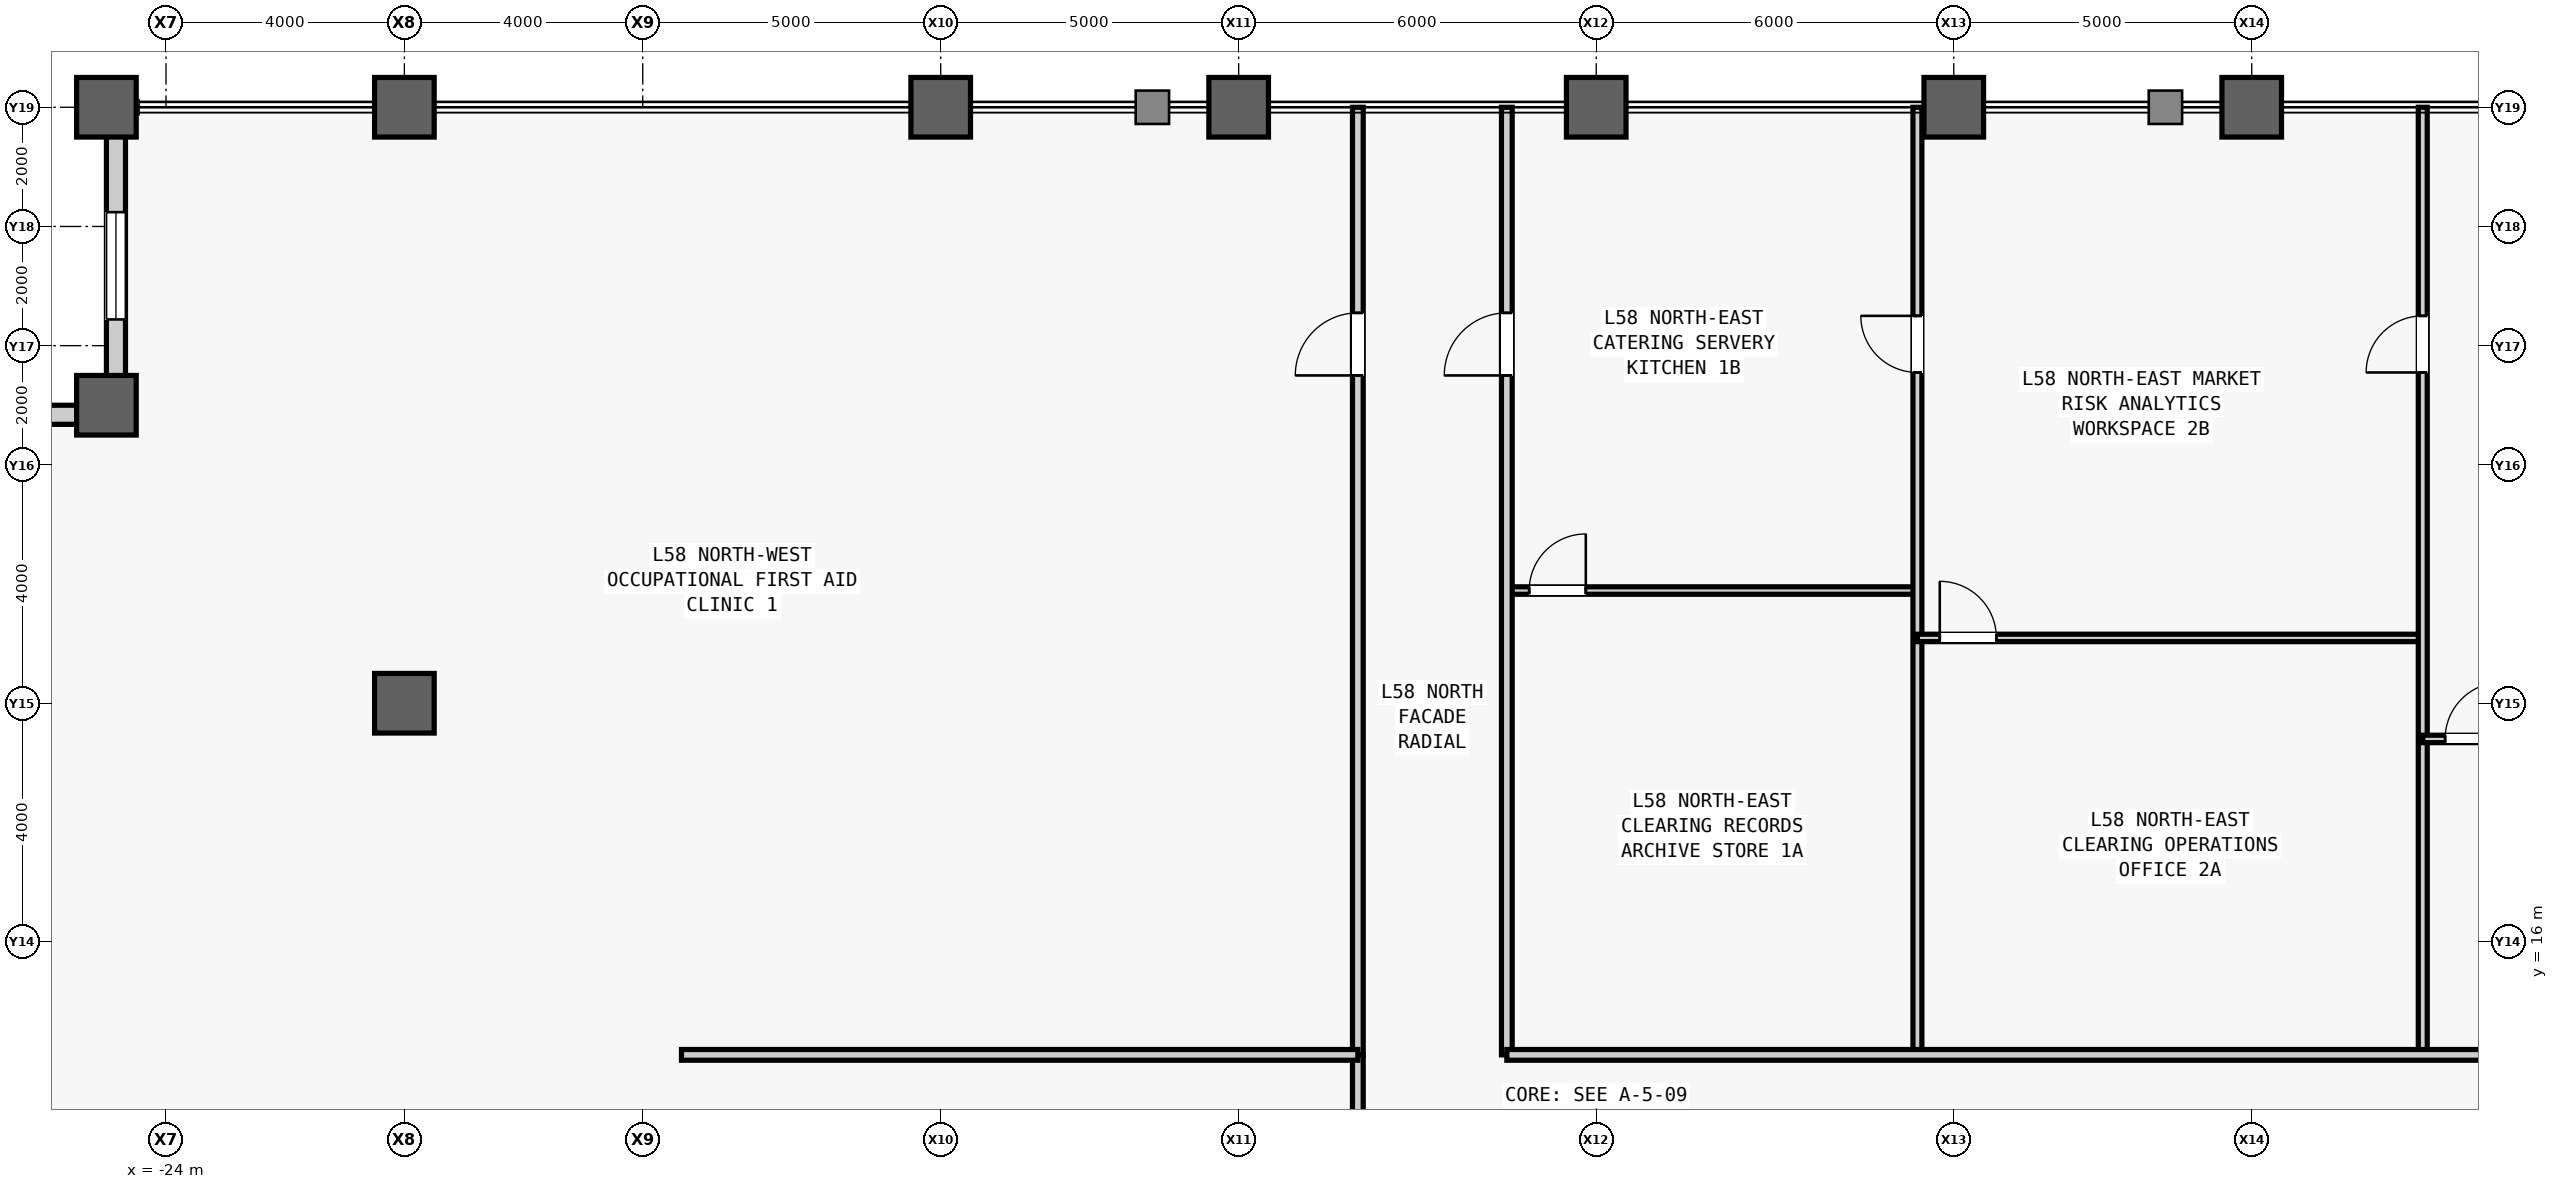
"""IFC4 building model, lengths in metres.
Left out: names, types, materials, properties, quantities, classifications, styles, units other than length and angle.
Written with IfcOpenShell. Run it as: python <this file> out.ifc"""

import sys

from ifc_helpers import new_model, si_unit, direction, frame, frame_2d, origin, origin_2d, place, context, subcontext, project, spatial, rectangle, hollow_rectangle, extrude, source, transform, mapped, element, fill, save


model = new_model("IFC4")
c1 = context("Model", 3, precision=1e-05, world=origin(), true_north=direction((0.0, 1.0)))
c2 = subcontext(c1, "Body", "Model", "MODEL_VIEW")
j1 = project(units=[si_unit("LENGTHUNIT", "METRE"), si_unit("PLANEANGLEUNIT", "RADIAN")], contexts=[c1])
p1 = place(None, origin())
s1 = spatial("IfcSite", under=j1, at=p1, CompositionType="ELEMENT")
p2 = place(p1, origin())
s2 = spatial("IfcBuilding", under=s1, at=p2, CompositionType="ELEMENT")
p3 = place(p2, frame((0.0, 0.0, 247.1)))
s3 = spatial("IfcBuildingStorey", under=s2, at=p3, CompositionType="ELEMENT", Elevation=247.1)
m1 = source(origin(), c2, "Body", "SweptSolid", [
    extrude(hollow_rectangle(XDim=1.0, YDim=1.0, WallThickness=0.055, at=origin_2d()), origin(), (0.0, 0.0, 1.0), 4.0),
])
for number, where, z_axis, x_axis in (
    (1, (-25.0, 25.0, 0.0), (0.0, 0.0, 1.0), (1.0, 0.0, 0.0)),
    (2, (-25.0, 30.0, 0.0), (0.0, 0.0, 1.0), (1.0, 0.0, 0.0)),
    (3, (-20.0, 20.0, 0.0), (0.0, 0.0, 1.0), (1.0, 0.0, 0.0)),
    (4, (-20.0, 30.0, 0.0), (0.0, 0.0, 1.0), (1.0, 0.0, 0.0)),
    (5, (-11.0, 30.0, 0.0), (0.0, 0.0, 1.0), (1.0, 0.0, 0.0)),
    (6, (-6.0, 30.0, 0.0), (0.0, 0.0, 1.0), (1.0, 0.0, 0.0)),
    (7, (0.0, 30.0, 0.0), (0.0, 0.0, 1.0), (1.0, 0.0, 0.0)),
    (8, (6.0, 30.0, 0.0), (0.0, 0.0, 1.0), (1.0, 0.0, 0.0)),
    (9, (11.0, 30.0, 0.0), (0.0, 0.0, 1.0), (1.0, 0.0, 0.0)),
):
    element("IfcColumn", number, at=place(p3, frame(where, z_axis=z_axis, x_axis=x_axis)), inside=s3, PredefinedType="COLUMN", context=c2, shape_type="MappedRepresentation", body=[
        mapped(m1, transform((0.0, 0.0, 0.0), scale=1.0)),
    ])
m2 = source(origin(), c2, "Body", "SweptSolid", [
    extrude(rectangle(XDim=4.68, YDim=0.32, at=frame_2d((2.34, 0.0))), origin(), (0.0, 0.0, 1.0), 3.164),
])
p4 = place(p3, frame((-24.84, 25.0, 0.0), z_axis=(0.0, 0.0, 1.0), x_axis=(0.0, 1.0, 0.0)))
e10 = element("IfcWall", 10, at=p4, inside=s3, PredefinedType="STANDARD", context=c2, shape_type="MappedRepresentation", body=[
    mapped(m2, transform((0.0, 0.0, 0.0), scale=1.0)),
])
m3 = source(origin(), c2, "Body", "SweptSolid", [
    extrude(rectangle(XDim=1.8, YDim=2.4, at=frame_2d((0.9, 1.2))), frame((0.0, 0.17, 0.0), z_axis=(0.0, -1.0, 0.0), x_axis=(1.0, 0.0, 0.0)), (0.0, 0.0, 1.0), 0.34),
])
p5 = place(p4, frame((1.44, 0.0, 0.5)))
e11 = element("IfcOpeningElement", 11, at=p5, cuts=e10, PredefinedType="OPENING", context=c2, shape_type="MappedRepresentation", body=[
    mapped(m3, transform((0.0, 0.0, 0.0), scale=1.0)),
])
p6 = place(p3, frame((-25.0, 24.84, 0.0), z_axis=(0.0, 0.0, 1.0), x_axis=(-1.0, 0.0, 0.0)))
e12 = element("IfcWall", 12, at=p6, inside=s3, PredefinedType="STANDARD", context=c2, shape_type="MappedRepresentation", body=[
    mapped(m2, transform((0.0, 0.0, 0.0), scale=1.0)),
])
p7 = place(p6, frame((1.44, 0.0, 0.5)))
e13 = element("IfcOpeningElement", 13, at=p7, cuts=e12, PredefinedType="OPENING", context=c2, shape_type="MappedRepresentation", body=[
    mapped(m3, transform((0.0, 0.0, 0.0), scale=1.0)),
])
m4 = source(origin(), c2, "Body", "SweptSolid", [
    extrude(rectangle(XDim=3.1, YDim=0.18, at=frame_2d((1.55, 0.0))), origin(), (0.0, 0.0, 1.0), 3.78),
])
p8 = place(p3, frame((-4.0, 11.0, 0.0), z_axis=(0.0, 0.0, 1.0), x_axis=(0.0, 1.0, 0.0)))
e14 = element("IfcWall", 14, at=p8, inside=s3, PredefinedType="PARTITIONING", context=c2, shape_type="MappedRepresentation", body=[
    mapped(m4, transform((0.0, 0.0, 0.0), scale=1.0)),
])
m5 = source(origin(), c2, "Body", "SweptSolid", [
    extrude(rectangle(XDim=15.9, YDim=0.18, at=frame_2d((7.95, 0.0))), origin(), (0.0, 0.0, 1.0), 3.78),
])
p9 = place(p3, frame((-4.0, 14.1, 0.0), z_axis=(0.0, 0.0, 1.0), x_axis=(0.0, 1.0, 0.0)))
e15 = element("IfcWall", 15, at=p9, inside=s3, PredefinedType="PARTITIONING", context=c2, shape_type="MappedRepresentation", body=[
    mapped(m5, transform((0.0, 0.0, 0.0), scale=1.0)),
])
m6 = source(origin(), c2, "Body", "SweptSolid", [
    extrude(rectangle(XDim=1.05, YDim=2.2, at=frame_2d((0.525, 1.1))), frame((0.0, 0.1, 0.0), z_axis=(0.0, -1.0, 0.0), x_axis=(1.0, 0.0, 0.0)), (0.0, 0.0, 1.0), 0.2),
])
p10 = place(p9, frame((11.4, 0.0, 0.0)))
e16 = element("IfcOpeningElement", 16, at=p10, cuts=e15, PredefinedType="OPENING", context=c2, shape_type="MappedRepresentation", body=[
    mapped(m6, transform((0.0, 0.0, 0.0), scale=1.0)),
])
m7 = source(origin(), c2, "Body", "SweptSolid", [
    extrude(rectangle(XDim=11.35, YDim=0.18, at=frame_2d((5.675, 0.0))), origin(), (0.0, 0.0, 1.0), 3.78),
])
p11 = place(p3, frame((-15.35, 14.1, 0.0), z_axis=(0.0, 0.0, 1.0), x_axis=(1.0, 0.0, 0.0)))
e17 = element("IfcWall", 17, at=p11, inside=s3, PredefinedType="PARTITIONING", context=c2, shape_type="MappedRepresentation", body=[
    mapped(m7, transform((0.0, 0.0, 0.0), scale=1.0)),
])
m8 = source(origin(), c2, "Body", "SweptSolid", [
    extrude(rectangle(XDim=6.89, YDim=0.125, at=frame_2d((3.445, 0.0))), origin(), (0.0, 0.0, 1.0), 3.78),
])
p12 = place(p3, frame((-1.5, 21.891, 0.0), z_axis=(0.0, 0.0, 1.0), x_axis=(1.0, 0.0, 0.0)))
e18 = element("IfcWall", 18, at=p12, inside=s3, PredefinedType="PARTITIONING", context=c2, shape_type="MappedRepresentation", body=[
    mapped(m8, transform((0.0, 0.0, 0.0), scale=1.0)),
])
m9 = source(origin(), c2, "Body", "SweptSolid", [
    extrude(rectangle(XDim=0.95, YDim=2.15, at=frame_2d((0.475, 1.075))), frame((0.0, 0.073, 0.0), z_axis=(0.0, -1.0, 0.0), x_axis=(1.0, 0.0, 0.0)), (0.0, 0.0, 1.0), 0.145),
])
p13 = place(p12, frame((0.375, 0.0, 0.0)))
e19 = element("IfcOpeningElement", 19, at=p13, cuts=e18, PredefinedType="OPENING", context=c2, shape_type="MappedRepresentation", body=[
    mapped(m9, transform((0.0, 0.0, 0.0), scale=1.0)),
])
m10 = source(origin(), c2, "Body", "SweptSolid", [
    extrude(rectangle(XDim=15.9, YDim=0.15, at=frame_2d((7.95, 0.0))), origin(), (0.0, 0.0, 1.0), 3.78),
])
p14 = place(p3, frame((5.39, 14.1, 0.0), z_axis=(0.0, 0.0, 1.0), x_axis=(0.0, 1.0, 0.0)))
e20 = element("IfcWall", 20, at=p14, inside=s3, PredefinedType="PARTITIONING", context=c2, shape_type="MappedRepresentation", body=[
    mapped(m10, transform((0.0, 0.0, 0.0), scale=1.0)),
])
m11 = source(origin(), c2, "Body", "SweptSolid", [
    extrude(rectangle(XDim=0.95, YDim=2.15, at=frame_2d((0.475, 1.075))), frame((0.0, 0.085, 0.0), z_axis=(0.0, -1.0, 0.0), x_axis=(1.0, 0.0, 0.0)), (0.0, 0.0, 1.0), 0.17),
])
p15 = place(p14, frame((11.45, 0.0, 0.0)))
e21 = element("IfcOpeningElement", 21, at=p15, cuts=e20, PredefinedType="OPENING", context=c2, shape_type="MappedRepresentation", body=[
    mapped(m11, transform((0.0, 0.0, 0.0), scale=1.0)),
])
m12 = source(origin(), c2, "Body", "SweptSolid", [
    extrude(rectangle(XDim=8.48, YDim=0.125, at=frame_2d((4.24, 0.0))), origin(), (0.0, 0.0, 1.0), 3.78),
])
p16 = place(p3, frame((5.39, 21.096, 0.0), z_axis=(0.0, 0.0, 1.0), x_axis=(1.0, 0.0, 0.0)))
e22 = element("IfcWall", 22, at=p16, inside=s3, PredefinedType="PARTITIONING", context=c2, shape_type="MappedRepresentation", body=[
    mapped(m12, transform((0.0, 0.0, 0.0), scale=1.0)),
])
p17 = place(p16, frame((0.375, 0.0, 0.0)))
e23 = element("IfcOpeningElement", 23, at=p17, cuts=e22, PredefinedType="OPENING", context=c2, shape_type="MappedRepresentation", body=[
    mapped(m9, transform((0.0, 0.0, 0.0), scale=1.0)),
])
p18 = place(p3, frame((13.87, 14.1, 0.0), z_axis=(0.0, 0.0, 1.0), x_axis=(0.0, 1.0, 0.0)))
e24 = element("IfcWall", 24, at=p18, inside=s3, PredefinedType="PARTITIONING", context=c2, shape_type="MappedRepresentation", body=[
    mapped(m10, transform((0.0, 0.0, 0.0), scale=1.0)),
])
p19 = place(p18, frame((11.45, 0.0, 0.0)))
e25 = element("IfcOpeningElement", 25, at=p19, cuts=e24, PredefinedType="OPENING", context=c2, shape_type="MappedRepresentation", body=[
    mapped(m11, transform((0.0, 0.0, 0.0), scale=1.0)),
])
m13 = source(origin(), c2, "Body", "SweptSolid", [
    extrude(rectangle(XDim=6.36, YDim=0.125, at=frame_2d((3.18, 0.0))), origin(), (0.0, 0.0, 1.0), 3.363),
])
p20 = place(p3, frame((13.87, 19.401, 0.0), z_axis=(0.0, 0.0, 1.0), x_axis=(1.0, 0.0, 0.0)))
e26 = element("IfcWall", 26, at=p20, inside=s3, PredefinedType="PARTITIONING", context=c2, shape_type="MappedRepresentation", body=[
    mapped(m13, transform((0.0, 0.0, 0.0), scale=1.0)),
])
p21 = place(p20, frame((0.375, 0.0, 0.0)))
e27 = element("IfcOpeningElement", 27, at=p21, cuts=e26, PredefinedType="OPENING", context=c2, shape_type="MappedRepresentation", body=[
    mapped(m9, transform((0.0, 0.0, 0.0), scale=1.0)),
])
p22 = place(p3, frame((-1.5, 14.1, 0.0), z_axis=(0.0, 0.0, 1.0), x_axis=(0.0, 1.0, 0.0)))
e28 = element("IfcWall", 28, at=p22, inside=s3, PredefinedType="PARTITIONING", context=c2, shape_type="MappedRepresentation", body=[
    mapped(m5, transform((0.0, 0.0, 0.0), scale=1.0)),
])
p23 = place(p22, frame((11.4, 0.0, 0.0)))
e29 = element("IfcOpeningElement", 29, at=p23, cuts=e28, PredefinedType="OPENING", context=c2, shape_type="MappedRepresentation", body=[
    mapped(m6, transform((0.0, 0.0, 0.0), scale=1.0)),
])
m14 = source(origin(), c2, "Body", "SweptSolid", [
    extrude(rectangle(XDim=16.85, YDim=0.18, at=frame_2d((8.425, 0.0))), origin(), (0.0, 0.0, 1.0), 3.78),
])
p24 = place(p3, frame((-1.5, 14.1, 0.0), z_axis=(0.0, 0.0, 1.0), x_axis=(1.0, 0.0, 0.0)))
e30 = element("IfcWall", 30, at=p24, inside=s3, PredefinedType="PARTITIONING", context=c2, shape_type="MappedRepresentation", body=[
    mapped(m14, transform((0.0, 0.0, 0.0), scale=1.0)),
])
m15 = source(origin(), c2, "Body", "SweptSolid", [
    extrude(rectangle(XDim=1.8, YDim=2.4, at=frame_2d((0.9, 1.2))), frame((0.0, 0.03, 0.0), z_axis=(0.0, -1.0, 0.0), x_axis=(1.0, 0.0, 0.0)), (0.0, 0.0, 1.0), 0.06),
])
p25 = place(p5, origin())
e31 = element("IfcWindow", 31, at=p25, inside=s3, PartitioningType="SINGLE_PANEL", PredefinedType="WINDOW", context=c2, shape_type="MappedRepresentation", body=[
    mapped(m15, transform((0.0, 0.0, 0.0), scale=1.0)),
])
fill(e11, e31)
m16 = source(origin(), c2, "Body", "SweptSolid", [
    extrude(rectangle(XDim=1.05, YDim=2.2, at=frame_2d((0.525, 1.1))), frame((0.0, 0.025, 0.0), z_axis=(0.0, -1.0, 0.0), x_axis=(1.0, 0.0, 0.0)), (0.0, 0.0, 1.0), 0.05),
])
p26 = place(p10, origin())
e32 = element("IfcDoor", 32, at=p26, inside=s3, OperationType="SINGLE_SWING_LEFT", PredefinedType="DOOR", context=c2, shape_type="MappedRepresentation", body=[
    mapped(m16, transform((0.0, 0.0, 0.0), scale=1.0)),
])
fill(e16, e32)
m17 = source(origin(), c2, "Body", "SweptSolid", [
    extrude(rectangle(XDim=0.95, YDim=2.15, at=frame_2d((0.475, 1.075))), frame((0.0, 0.025, 0.0), z_axis=(0.0, -1.0, 0.0), x_axis=(1.0, 0.0, 0.0)), (0.0, 0.0, 1.0), 0.05),
])
p27 = place(p13, origin())
e33 = element("IfcDoor", 33, at=p27, inside=s3, OperationType="SINGLE_SWING_RIGHT", PredefinedType="DOOR", context=c2, shape_type="MappedRepresentation", body=[
    mapped(m17, transform((0.0, 0.0, 0.0), scale=1.0)),
])
fill(e19, e33)
p28 = place(p15, origin())
e34 = element("IfcDoor", 34, at=p28, inside=s3, OperationType="SINGLE_SWING_RIGHT", PredefinedType="DOOR", context=c2, shape_type="MappedRepresentation", body=[
    mapped(m17, transform((0.0, 0.0, 0.0), scale=1.0)),
])
fill(e21, e34)
p29 = place(p17, origin())
e35 = element("IfcDoor", 35, at=p29, inside=s3, OperationType="SINGLE_SWING_LEFT", PredefinedType="DOOR", context=c2, shape_type="MappedRepresentation", body=[
    mapped(m17, transform((0.0, 0.0, 0.0), scale=1.0)),
])
fill(e23, e35)
p30 = place(p19, origin())
e36 = element("IfcDoor", 36, at=p30, inside=s3, OperationType="SINGLE_SWING_LEFT", PredefinedType="DOOR", context=c2, shape_type="MappedRepresentation", body=[
    mapped(m17, transform((0.0, 0.0, 0.0), scale=1.0)),
])
fill(e25, e36)
p31 = place(p21, origin())
e37 = element("IfcDoor", 37, at=p31, inside=s3, OperationType="SINGLE_SWING_RIGHT", PredefinedType="DOOR", context=c2, shape_type="MappedRepresentation", body=[
    mapped(m17, transform((0.0, 0.0, 0.0), scale=1.0)),
])
fill(e27, e37)
p32 = place(p23, origin())
e38 = element("IfcDoor", 38, at=p32, inside=s3, OperationType="SINGLE_SWING_LEFT", PredefinedType="DOOR", context=c2, shape_type="MappedRepresentation", body=[
    mapped(m16, transform((0.0, 0.0, 0.0), scale=1.0)),
])
fill(e29, e38)
save(model, sys.argv[1])
